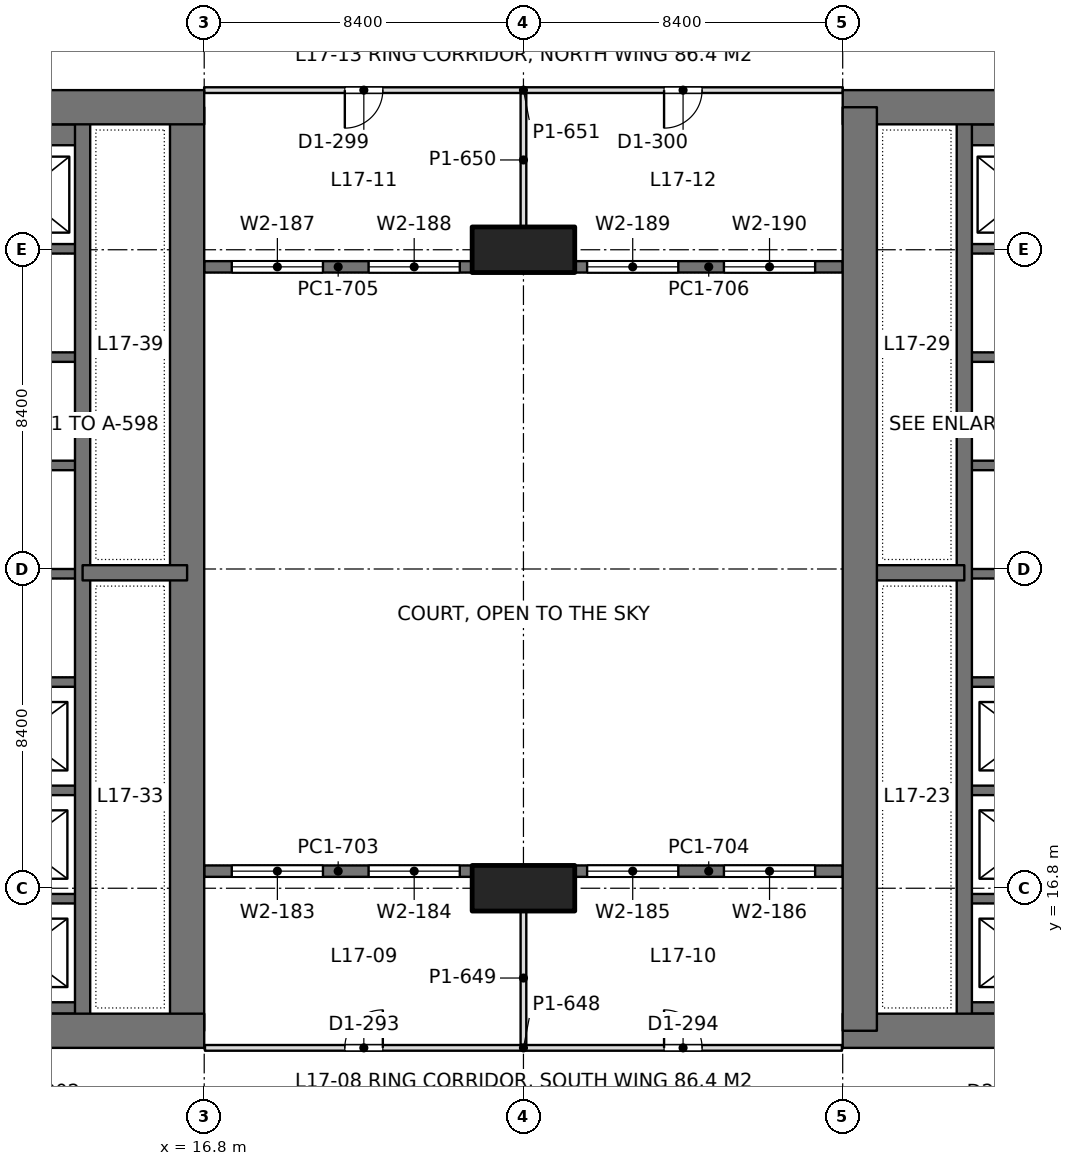
"""IFC4 building model, lengths in metres.
Left out: names, types, materials, properties, quantities, classifications, styles, units other than length and angle.
Written with IfcOpenShell. Run it as: python <this file> out.ifc"""

import sys

from ifc_helpers import new_model, si_unit, direction, frame, frame_2d, origin, origin_2d, place, context, subcontext, project, spatial, rectangle, extrude, element, fill, save


model = new_model("IFC4")
c1 = context("Model", 3, precision=1e-05, world=origin(), true_north=direction((0.0, 1.0)))
c2 = subcontext(c1, "Body", "Model", "MODEL_VIEW")
j1 = project(units=[si_unit("LENGTHUNIT", "METRE"), si_unit("PLANEANGLEUNIT", "RADIAN")], contexts=[c1])
p1 = place(None, origin())
s1 = spatial("IfcSite", under=j1, at=p1, CompositionType="ELEMENT")
p2 = place(p1, origin())
s2 = spatial("IfcBuilding", under=s1, at=p2, CompositionType="ELEMENT")
p3 = place(p2, frame((0.0, 0.0, 77.4)))
s3 = spatial("IfcBuildingStorey", under=s2, at=p3, CompositionType="ELEMENT", Elevation=77.4)
for number, where, z_axis, x_axis in (
    (1, (25.2, 16.8, 0.0), (0.0, 0.0, 1.0), (1.0, 0.0, 0.0)),
    (2, (25.2, 33.6, 0.0), (0.0, 0.0, 1.0), (1.0, 0.0, 0.0)),
):
    element("IfcColumn", number, at=place(p3, frame(where, z_axis=z_axis, x_axis=x_axis)), inside=s3, PredefinedType="COLUMN", context=c2, shape_type="SweptSolid", body=[
        extrude(rectangle(XDim=2.7, YDim=1.2, at=origin_2d()), origin(), (0.0, 0.0, 1.0), 4.5),
    ])
p4 = place(p3, frame((-1.2, 13.05, 0.0), z_axis=(0.0, 0.0, 1.0), x_axis=(1.0, 0.0, 0.0)))
e3 = element("IfcWall", 3, at=p4, inside=s3, PredefinedType="SHEAR", context=c2, shape_type="SweptSolid", body=[
    extrude(rectangle(XDim=18.0, YDim=0.9, at=frame_2d((9.0, 0.0))), origin(), (0.0, 0.0, 1.0), 4.5),
])
p5 = place(p4, frame((8.95, 0.0, 0.0)))
e4 = element("IfcOpeningElement", 4, at=p5, cuts=e3, PredefinedType="OPENING", context=c2, shape_type="SweptSolid", body=[
    extrude(rectangle(XDim=1.8, YDim=2.4, at=frame_2d((0.9, 1.2))), frame((0.0, 0.46, 0.0), z_axis=(0.0, -1.0, 0.0), x_axis=(1.0, 0.0, 0.0)), (0.0, 0.0, 1.0), 0.92),
])
p6 = place(p3, frame((-1.2, 37.35, 0.0), z_axis=(0.0, 0.0, 1.0), x_axis=(1.0, 0.0, 0.0)))
e5 = element("IfcWall", 5, at=p6, inside=s3, PredefinedType="SHEAR", context=c2, shape_type="SweptSolid", body=[
    extrude(rectangle(XDim=18.0, YDim=0.9, at=frame_2d((9.0, 0.0))), origin(), (0.0, 0.0, 1.0), 4.5),
])
p7 = place(p6, frame((8.95, 0.0, 0.0)))
e6 = element("IfcOpeningElement", 6, at=p7, cuts=e5, PredefinedType="OPENING", context=c2, shape_type="SweptSolid", body=[
    extrude(rectangle(XDim=1.8, YDim=2.4, at=frame_2d((0.9, 1.2))), frame((0.0, 0.46, 0.0), z_axis=(0.0, -1.0, 0.0), x_axis=(1.0, 0.0, 0.0)), (0.0, 0.0, 1.0), 0.92),
])
p8 = place(p3, frame((16.35, 13.05, 0.0), z_axis=(0.0, 0.0, 1.0), x_axis=(0.0, 1.0, 0.0)))
e7 = element("IfcWall", 7, at=p8, inside=s3, PredefinedType="SHEAR", context=c2, shape_type="SweptSolid", body=[
    extrude(rectangle(XDim=24.3, YDim=0.9, at=frame_2d((12.15, 0.0))), origin(), (0.0, 0.0, 1.0), 4.5),
])
p9 = place(p3, frame((13.6, 13.05, 0.0), z_axis=(0.0, 0.0, 1.0), x_axis=(0.0, 1.0, 0.0)))
e8 = element("IfcWall", 8, at=p9, inside=s3, PredefinedType="SHEAR", context=c2, shape_type="SweptSolid", body=[
    extrude(rectangle(XDim=24.3, YDim=0.4, at=frame_2d((12.15, 0.0))), origin(), (0.0, 0.0, 1.0), 4.5),
])
p10 = place(p3, frame((13.6, 25.1, 0.0), z_axis=(0.0, 0.0, 1.0), x_axis=(1.0, 0.0, 0.0)))
e9 = element("IfcWall", 9, at=p10, inside=s3, PredefinedType="SHEAR", context=c2, shape_type="SweptSolid", body=[
    extrude(rectangle(XDim=2.75, YDim=0.4, at=frame_2d((1.375, 0.0))), origin(), (0.0, 0.0, 1.0), 4.5),
])
p11 = place(p3, frame((10.4, 13.65, 0.0), z_axis=(0.0, 0.0, 1.0), x_axis=(1.0, 0.0, 0.0)))
e10 = element("IfcWall", 10, at=p11, inside=s3, PredefinedType="SHEAR", context=c2, shape_type="SweptSolid", body=[
    extrude(rectangle(XDim=3.2, YDim=0.3, at=frame_2d((1.6, 0.0))), origin(), (0.0, 0.0, 1.0), 4.5),
])
for number, where, z_axis, x_axis in (
    (11, (10.4, 16.525, 0.0), (0.0, 0.0, 1.0), (1.0, 0.0, 0.0)),
    (12, (10.4, 19.375, 0.0), (0.0, 0.0, 1.0), (1.0, 0.0, 0.0)),
    (13, (10.4, 22.225, 0.0), (0.0, 0.0, 1.0), (1.0, 0.0, 0.0)),
    (14, (10.4, 25.075, 0.0), (0.0, 0.0, 1.0), (1.0, 0.0, 0.0)),
    (15, (10.4, 27.925, 0.0), (0.0, 0.0, 1.0), (1.0, 0.0, 0.0)),
    (16, (10.4, 30.775, 0.0), (0.0, 0.0, 1.0), (1.0, 0.0, 0.0)),
    (17, (10.4, 33.625, 0.0), (0.0, 0.0, 1.0), (1.0, 0.0, 0.0)),
):
    element("IfcWall", number, at=place(p3, frame(where, z_axis=z_axis, x_axis=x_axis)), inside=s3, PredefinedType="SHEAR", context=c2, shape_type="SweptSolid", body=[
        extrude(rectangle(XDim=3.2, YDim=0.25, at=frame_2d((1.6, 0.0))), origin(), (0.0, 0.0, 1.0), 4.5),
    ])
p12 = place(p3, frame((10.4, 36.625, 0.0), z_axis=(0.0, 0.0, 1.0), x_axis=(1.0, 0.0, 0.0)))
e18 = element("IfcWall", 18, at=p12, inside=s3, PredefinedType="SHEAR", context=c2, shape_type="SweptSolid", body=[
    extrude(rectangle(XDim=3.2, YDim=0.55, at=frame_2d((1.6, 0.0))), origin(), (0.0, 0.0, 1.0), 4.5),
])
p13 = place(p3, frame((33.6, 13.05, 0.0), z_axis=(0.0, 0.0, 1.0), x_axis=(1.0, 0.0, 0.0)))
e19 = element("IfcWall", 19, at=p13, inside=s3, PredefinedType="SHEAR", context=c2, shape_type="SweptSolid", body=[
    extrude(rectangle(XDim=18.0, YDim=0.9, at=frame_2d((9.0, 0.0))), origin(), (0.0, 0.0, 1.0), 4.5),
])
p14 = place(p13, frame((7.25, 0.0, 0.0)))
e20 = element("IfcOpeningElement", 20, at=p14, cuts=e19, PredefinedType="OPENING", context=c2, shape_type="SweptSolid", body=[
    extrude(rectangle(XDim=1.8, YDim=2.4, at=frame_2d((0.9, 1.2))), frame((0.0, 0.46, 0.0), z_axis=(0.0, -1.0, 0.0), x_axis=(1.0, 0.0, 0.0)), (0.0, 0.0, 1.0), 0.92),
])
p15 = place(p3, frame((33.6, 37.35, 0.0), z_axis=(0.0, 0.0, 1.0), x_axis=(1.0, 0.0, 0.0)))
e21 = element("IfcWall", 21, at=p15, inside=s3, PredefinedType="SHEAR", context=c2, shape_type="SweptSolid", body=[
    extrude(rectangle(XDim=18.0, YDim=0.9, at=frame_2d((9.0, 0.0))), origin(), (0.0, 0.0, 1.0), 4.5),
])
p16 = place(p15, frame((7.25, 0.0, 0.0)))
e22 = element("IfcOpeningElement", 22, at=p16, cuts=e21, PredefinedType="OPENING", context=c2, shape_type="SweptSolid", body=[
    extrude(rectangle(XDim=1.8, YDim=2.4, at=frame_2d((0.9, 1.2))), frame((0.0, 0.46, 0.0), z_axis=(0.0, -1.0, 0.0), x_axis=(1.0, 0.0, 0.0)), (0.0, 0.0, 1.0), 0.92),
])
p17 = place(p3, frame((34.05, 13.05, 0.0), z_axis=(0.0, 0.0, 1.0), x_axis=(0.0, 1.0, 0.0)))
e23 = element("IfcWall", 23, at=p17, inside=s3, PredefinedType="SHEAR", context=c2, shape_type="SweptSolid", body=[
    extrude(rectangle(XDim=24.3, YDim=0.9, at=frame_2d((12.15, 0.0))), origin(), (0.0, 0.0, 1.0), 4.5),
])
p18 = place(p3, frame((36.8, 13.05, 0.0), z_axis=(0.0, 0.0, 1.0), x_axis=(0.0, 1.0, 0.0)))
e24 = element("IfcWall", 24, at=p18, inside=s3, PredefinedType="SHEAR", context=c2, shape_type="SweptSolid", body=[
    extrude(rectangle(XDim=24.3, YDim=0.4, at=frame_2d((12.15, 0.0))), origin(), (0.0, 0.0, 1.0), 4.5),
])
p19 = place(p3, frame((36.8, 25.1, 0.0), z_axis=(0.0, 0.0, 1.0), x_axis=(-1.0, 0.0, 0.0)))
e25 = element("IfcWall", 25, at=p19, inside=s3, PredefinedType="SHEAR", context=c2, shape_type="SweptSolid", body=[
    extrude(rectangle(XDim=2.75, YDim=0.4, at=frame_2d((1.375, 0.0))), origin(), (0.0, 0.0, 1.0), 4.5),
])
p20 = place(p3, frame((40.0, 13.65, 0.0), z_axis=(0.0, 0.0, 1.0), x_axis=(-1.0, 0.0, 0.0)))
e26 = element("IfcWall", 26, at=p20, inside=s3, PredefinedType="SHEAR", context=c2, shape_type="SweptSolid", body=[
    extrude(rectangle(XDim=3.2, YDim=0.3, at=frame_2d((1.6, 0.0))), origin(), (0.0, 0.0, 1.0), 4.5),
])
for number, where, z_axis, x_axis in (
    (27, (40.0, 16.525, 0.0), (0.0, 0.0, 1.0), (-1.0, 0.0, 0.0)),
    (28, (40.0, 19.375, 0.0), (0.0, 0.0, 1.0), (-1.0, 0.0, 0.0)),
    (29, (40.0, 22.225, 0.0), (0.0, 0.0, 1.0), (-1.0, 0.0, 0.0)),
    (30, (40.0, 25.075, 0.0), (0.0, 0.0, 1.0), (-1.0, 0.0, 0.0)),
    (31, (40.0, 27.925, 0.0), (0.0, 0.0, 1.0), (-1.0, 0.0, 0.0)),
    (32, (40.0, 30.775, 0.0), (0.0, 0.0, 1.0), (-1.0, 0.0, 0.0)),
    (33, (40.0, 33.625, 0.0), (0.0, 0.0, 1.0), (-1.0, 0.0, 0.0)),
):
    element("IfcWall", number, at=place(p3, frame(where, z_axis=z_axis, x_axis=x_axis)), inside=s3, PredefinedType="SHEAR", context=c2, shape_type="SweptSolid", body=[
        extrude(rectangle(XDim=3.2, YDim=0.25, at=frame_2d((1.6, 0.0))), origin(), (0.0, 0.0, 1.0), 4.5),
    ])
p21 = place(p3, frame((40.0, 36.625, 0.0), z_axis=(0.0, 0.0, 1.0), x_axis=(-1.0, 0.0, 0.0)))
e34 = element("IfcWall", 34, at=p21, inside=s3, PredefinedType="SHEAR", context=c2, shape_type="SweptSolid", body=[
    extrude(rectangle(XDim=3.2, YDim=0.55, at=frame_2d((1.6, 0.0))), origin(), (0.0, 0.0, 1.0), 4.5),
])
p22 = place(p3, frame((16.8, 17.25, 0.0), z_axis=(0.0, 0.0, 1.0), x_axis=(1.0, 0.0, 0.0)))
e35 = element("IfcWall", 35, at=p22, inside=s3, PredefinedType="SOLIDWALL", context=c2, shape_type="SweptSolid", body=[
    extrude(rectangle(XDim=7.05, YDim=0.3, at=frame_2d((3.525, 0.0))), origin(), (0.0, 0.0, 1.0), 4.34),
])
p23 = place(p22, frame((0.725, 0.0, 0.9)))
e36 = element("IfcOpeningElement", 36, at=p23, cuts=e35, PredefinedType="OPENING", context=c2, shape_type="SweptSolid", body=[
    extrude(rectangle(XDim=2.4, YDim=1.9, at=frame_2d((1.2, 0.95))), frame((0.0, 0.16, 0.0), z_axis=(0.0, -1.0, 0.0), x_axis=(1.0, 0.0, 0.0)), (0.0, 0.0, 1.0), 0.32),
])
p24 = place(p22, frame((4.325, 0.0, 0.9)))
e37 = element("IfcOpeningElement", 37, at=p24, cuts=e35, PredefinedType="OPENING", context=c2, shape_type="SweptSolid", body=[
    extrude(rectangle(XDim=2.4, YDim=1.9, at=frame_2d((1.2, 0.95))), frame((0.0, 0.16, 0.0), z_axis=(0.0, -1.0, 0.0), x_axis=(1.0, 0.0, 0.0)), (0.0, 0.0, 1.0), 0.32),
])
p25 = place(p3, frame((26.55, 17.25, 0.0), z_axis=(0.0, 0.0, 1.0), x_axis=(1.0, 0.0, 0.0)))
e38 = element("IfcWall", 38, at=p25, inside=s3, PredefinedType="SOLIDWALL", context=c2, shape_type="SweptSolid", body=[
    extrude(rectangle(XDim=7.05, YDim=0.3, at=frame_2d((3.525, 0.0))), origin(), (0.0, 0.0, 1.0), 4.34),
])
p26 = place(p25, frame((0.325, 0.0, 0.9)))
e39 = element("IfcOpeningElement", 39, at=p26, cuts=e38, PredefinedType="OPENING", context=c2, shape_type="SweptSolid", body=[
    extrude(rectangle(XDim=2.4, YDim=1.9, at=frame_2d((1.2, 0.95))), frame((0.0, 0.16, 0.0), z_axis=(0.0, -1.0, 0.0), x_axis=(1.0, 0.0, 0.0)), (0.0, 0.0, 1.0), 0.32),
])
p27 = place(p25, frame((3.925, 0.0, 0.9)))
e40 = element("IfcOpeningElement", 40, at=p27, cuts=e38, PredefinedType="OPENING", context=c2, shape_type="SweptSolid", body=[
    extrude(rectangle(XDim=2.4, YDim=1.9, at=frame_2d((1.2, 0.95))), frame((0.0, 0.16, 0.0), z_axis=(0.0, -1.0, 0.0), x_axis=(1.0, 0.0, 0.0)), (0.0, 0.0, 1.0), 0.32),
])
p28 = place(p3, frame((16.8, 33.15, 0.0), z_axis=(0.0, 0.0, 1.0), x_axis=(1.0, 0.0, 0.0)))
e41 = element("IfcWall", 41, at=p28, inside=s3, PredefinedType="SOLIDWALL", context=c2, shape_type="SweptSolid", body=[
    extrude(rectangle(XDim=7.05, YDim=0.3, at=frame_2d((3.525, 0.0))), origin(), (0.0, 0.0, 1.0), 4.34),
])
p29 = place(p28, frame((0.725, 0.0, 0.9)))
e42 = element("IfcOpeningElement", 42, at=p29, cuts=e41, PredefinedType="OPENING", context=c2, shape_type="SweptSolid", body=[
    extrude(rectangle(XDim=2.4, YDim=1.9, at=frame_2d((1.2, 0.95))), frame((0.0, 0.16, 0.0), z_axis=(0.0, -1.0, 0.0), x_axis=(1.0, 0.0, 0.0)), (0.0, 0.0, 1.0), 0.32),
])
p30 = place(p28, frame((4.325, 0.0, 0.9)))
e43 = element("IfcOpeningElement", 43, at=p30, cuts=e41, PredefinedType="OPENING", context=c2, shape_type="SweptSolid", body=[
    extrude(rectangle(XDim=2.4, YDim=1.9, at=frame_2d((1.2, 0.95))), frame((0.0, 0.16, 0.0), z_axis=(0.0, -1.0, 0.0), x_axis=(1.0, 0.0, 0.0)), (0.0, 0.0, 1.0), 0.32),
])
p31 = place(p3, frame((26.55, 33.15, 0.0), z_axis=(0.0, 0.0, 1.0), x_axis=(1.0, 0.0, 0.0)))
e44 = element("IfcWall", 44, at=p31, inside=s3, PredefinedType="SOLIDWALL", context=c2, shape_type="SweptSolid", body=[
    extrude(rectangle(XDim=7.05, YDim=0.3, at=frame_2d((3.525, 0.0))), origin(), (0.0, 0.0, 1.0), 4.34),
])
p32 = place(p31, frame((0.325, 0.0, 0.9)))
e45 = element("IfcOpeningElement", 45, at=p32, cuts=e44, PredefinedType="OPENING", context=c2, shape_type="SweptSolid", body=[
    extrude(rectangle(XDim=2.4, YDim=1.9, at=frame_2d((1.2, 0.95))), frame((0.0, 0.16, 0.0), z_axis=(0.0, -1.0, 0.0), x_axis=(1.0, 0.0, 0.0)), (0.0, 0.0, 1.0), 0.32),
])
p33 = place(p31, frame((3.925, 0.0, 0.9)))
e46 = element("IfcOpeningElement", 46, at=p33, cuts=e44, PredefinedType="OPENING", context=c2, shape_type="SweptSolid", body=[
    extrude(rectangle(XDim=2.4, YDim=1.9, at=frame_2d((1.2, 0.95))), frame((0.0, 0.16, 0.0), z_axis=(0.0, -1.0, 0.0), x_axis=(1.0, 0.0, 0.0)), (0.0, 0.0, 1.0), 0.32),
])
p34 = place(p3, frame((16.82, 12.6, 0.0), z_axis=(0.0, 0.0, 1.0), x_axis=(1.0, 0.0, 0.0)))
e47 = element("IfcWall", 47, at=p34, inside=s3, PredefinedType="PARTITIONING", context=c2, shape_type="SweptSolid", body=[
    extrude(rectangle(XDim=16.76, YDim=0.15, at=frame_2d((8.38, 0.0))), origin(), (0.0, 0.0, 1.0), 3.74),
])
p35 = place(p34, frame((3.68, 0.0, 0.0)))
e48 = element("IfcOpeningElement", 48, at=p35, cuts=e47, PredefinedType="OPENING", context=c2, shape_type="SweptSolid", body=[
    extrude(rectangle(XDim=1.0, YDim=2.2, at=frame_2d((0.5, 1.1))), frame((0.0, 0.085, 0.0), z_axis=(0.0, -1.0, 0.0), x_axis=(1.0, 0.0, 0.0)), (0.0, 0.0, 1.0), 0.17),
])
p36 = place(p34, frame((12.08, 0.0, 0.0)))
e49 = element("IfcOpeningElement", 49, at=p36, cuts=e47, PredefinedType="OPENING", context=c2, shape_type="SweptSolid", body=[
    extrude(rectangle(XDim=1.0, YDim=2.2, at=frame_2d((0.5, 1.1))), frame((0.0, 0.085, 0.0), z_axis=(0.0, -1.0, 0.0), x_axis=(1.0, 0.0, 0.0)), (0.0, 0.0, 1.0), 0.17),
])
p37 = place(p3, frame((25.2, 12.674, 0.0), z_axis=(0.0, 0.0, 1.0), x_axis=(0.0, 1.0, 0.0)))
e50 = element("IfcWall", 50, at=p37, inside=s3, PredefinedType="PARTITIONING", context=c2, shape_type="SweptSolid", body=[
    extrude(rectangle(XDim=3.527, YDim=0.15, at=frame_2d((1.763, 0.0))), origin(), (0.0, 0.0, 1.0), 3.74),
])
p38 = place(p3, frame((16.798, 37.8, 0.0), z_axis=(0.0, 0.0, 1.0), x_axis=(1.0, 0.0, 0.0)))
e51 = element("IfcWall", 51, at=p38, inside=s3, PredefinedType="PARTITIONING", context=c2, shape_type="SweptSolid", body=[
    extrude(rectangle(XDim=16.804, YDim=0.15, at=frame_2d((8.402, 0.0))), origin(), (0.0, 0.0, 1.0), 3.74),
])
p39 = place(p38, frame((3.702, 0.0, 0.0)))
e52 = element("IfcOpeningElement", 52, at=p39, cuts=e51, PredefinedType="OPENING", context=c2, shape_type="SweptSolid", body=[
    extrude(rectangle(XDim=1.0, YDim=2.2, at=frame_2d((0.5, 1.1))), frame((0.0, 0.085, 0.0), z_axis=(0.0, -1.0, 0.0), x_axis=(1.0, 0.0, 0.0)), (0.0, 0.0, 1.0), 0.17),
])
p40 = place(p38, frame((12.102, 0.0, 0.0)))
e53 = element("IfcOpeningElement", 53, at=p40, cuts=e51, PredefinedType="OPENING", context=c2, shape_type="SweptSolid", body=[
    extrude(rectangle(XDim=1.0, YDim=2.2, at=frame_2d((0.5, 1.1))), frame((0.0, 0.085, 0.0), z_axis=(0.0, -1.0, 0.0), x_axis=(1.0, 0.0, 0.0)), (0.0, 0.0, 1.0), 0.17),
])
p41 = place(p3, frame((25.2, 34.199, 0.0), z_axis=(0.0, 0.0, 1.0), x_axis=(0.0, 1.0, 0.0)))
e54 = element("IfcWall", 54, at=p41, inside=s3, PredefinedType="PARTITIONING", context=c2, shape_type="SweptSolid", body=[
    extrude(rectangle(XDim=3.527, YDim=0.15, at=frame_2d((1.764, 0.0))), origin(), (0.0, 0.0, 1.0), 3.74),
])
p42 = place(p23, origin())
e55 = element("IfcWindow", 55, at=p42, inside=s3, PartitioningType="SINGLE_PANEL", PredefinedType="WINDOW", context=c2, shape_type="SweptSolid", body=[
    extrude(rectangle(XDim=2.4, YDim=1.9, at=frame_2d((1.2, 0.95))), frame((0.0, 0.03, 0.0), z_axis=(0.0, -1.0, 0.0), x_axis=(1.0, 0.0, 0.0)), (0.0, 0.0, 1.0), 0.06),
])
fill(e36, e55)
p43 = place(p24, origin())
e56 = element("IfcWindow", 56, at=p43, inside=s3, PartitioningType="SINGLE_PANEL", PredefinedType="WINDOW", context=c2, shape_type="SweptSolid", body=[
    extrude(rectangle(XDim=2.4, YDim=1.9, at=frame_2d((1.2, 0.95))), frame((0.0, 0.03, 0.0), z_axis=(0.0, -1.0, 0.0), x_axis=(1.0, 0.0, 0.0)), (0.0, 0.0, 1.0), 0.06),
])
fill(e37, e56)
p44 = place(p26, origin())
e57 = element("IfcWindow", 57, at=p44, inside=s3, PartitioningType="SINGLE_PANEL", PredefinedType="WINDOW", context=c2, shape_type="SweptSolid", body=[
    extrude(rectangle(XDim=2.4, YDim=1.9, at=frame_2d((1.2, 0.95))), frame((0.0, 0.03, 0.0), z_axis=(0.0, -1.0, 0.0), x_axis=(1.0, 0.0, 0.0)), (0.0, 0.0, 1.0), 0.06),
])
fill(e39, e57)
p45 = place(p27, origin())
e58 = element("IfcWindow", 58, at=p45, inside=s3, PartitioningType="SINGLE_PANEL", PredefinedType="WINDOW", context=c2, shape_type="SweptSolid", body=[
    extrude(rectangle(XDim=2.4, YDim=1.9, at=frame_2d((1.2, 0.95))), frame((0.0, 0.03, 0.0), z_axis=(0.0, -1.0, 0.0), x_axis=(1.0, 0.0, 0.0)), (0.0, 0.0, 1.0), 0.06),
])
fill(e40, e58)
p46 = place(p29, origin())
e59 = element("IfcWindow", 59, at=p46, inside=s3, PartitioningType="SINGLE_PANEL", PredefinedType="WINDOW", context=c2, shape_type="SweptSolid", body=[
    extrude(rectangle(XDim=2.4, YDim=1.9, at=frame_2d((1.2, 0.95))), frame((0.0, 0.03, 0.0), z_axis=(0.0, -1.0, 0.0), x_axis=(1.0, 0.0, 0.0)), (0.0, 0.0, 1.0), 0.06),
])
fill(e42, e59)
p47 = place(p30, origin())
e60 = element("IfcWindow", 60, at=p47, inside=s3, PartitioningType="SINGLE_PANEL", PredefinedType="WINDOW", context=c2, shape_type="SweptSolid", body=[
    extrude(rectangle(XDim=2.4, YDim=1.9, at=frame_2d((1.2, 0.95))), frame((0.0, 0.03, 0.0), z_axis=(0.0, -1.0, 0.0), x_axis=(1.0, 0.0, 0.0)), (0.0, 0.0, 1.0), 0.06),
])
fill(e43, e60)
p48 = place(p32, origin())
e61 = element("IfcWindow", 61, at=p48, inside=s3, PartitioningType="SINGLE_PANEL", PredefinedType="WINDOW", context=c2, shape_type="SweptSolid", body=[
    extrude(rectangle(XDim=2.4, YDim=1.9, at=frame_2d((1.2, 0.95))), frame((0.0, 0.03, 0.0), z_axis=(0.0, -1.0, 0.0), x_axis=(1.0, 0.0, 0.0)), (0.0, 0.0, 1.0), 0.06),
])
fill(e45, e61)
p49 = place(p33, origin())
e62 = element("IfcWindow", 62, at=p49, inside=s3, PartitioningType="SINGLE_PANEL", PredefinedType="WINDOW", context=c2, shape_type="SweptSolid", body=[
    extrude(rectangle(XDim=2.4, YDim=1.9, at=frame_2d((1.2, 0.95))), frame((0.0, 0.03, 0.0), z_axis=(0.0, -1.0, 0.0), x_axis=(1.0, 0.0, 0.0)), (0.0, 0.0, 1.0), 0.06),
])
fill(e46, e62)
p50 = place(p35, origin())
e63 = element("IfcDoor", 63, at=p50, inside=s3, OperationType="SINGLE_SWING_RIGHT", PredefinedType="DOOR", context=c2, shape_type="SweptSolid", body=[
    extrude(rectangle(XDim=1.0, YDim=2.2, at=frame_2d((0.5, 1.1))), frame((0.0, 0.025, 0.0), z_axis=(0.0, -1.0, 0.0), x_axis=(1.0, 0.0, 0.0)), (0.0, 0.0, 1.0), 0.05),
])
fill(e48, e63)
p51 = place(p36, origin())
e64 = element("IfcDoor", 64, at=p51, inside=s3, OperationType="SINGLE_SWING_LEFT", PredefinedType="DOOR", context=c2, shape_type="SweptSolid", body=[
    extrude(rectangle(XDim=1.0, YDim=2.2, at=frame_2d((0.5, 1.1))), frame((0.0, 0.025, 0.0), z_axis=(0.0, -1.0, 0.0), x_axis=(1.0, 0.0, 0.0)), (0.0, 0.0, 1.0), 0.05),
])
fill(e49, e64)
p52 = place(p39, frame((1.0, 0.0, 0.0), z_axis=(0.0, 0.0, 1.0), x_axis=(-1.0, 0.0, 0.0)))
e65 = element("IfcDoor", 65, at=p52, inside=s3, OperationType="SINGLE_SWING_RIGHT", PredefinedType="DOOR", context=c2, shape_type="SweptSolid", body=[
    extrude(rectangle(XDim=1.0, YDim=2.2, at=frame_2d((0.5, 1.1))), frame((0.0, 0.025, 0.0), z_axis=(0.0, -1.0, 0.0), x_axis=(1.0, 0.0, 0.0)), (0.0, 0.0, 1.0), 0.05),
])
fill(e52, e65)
p53 = place(p40, frame((1.0, 0.0, 0.0), z_axis=(0.0, 0.0, 1.0), x_axis=(-1.0, 0.0, 0.0)))
e66 = element("IfcDoor", 66, at=p53, inside=s3, OperationType="SINGLE_SWING_RIGHT", PredefinedType="DOOR", context=c2, shape_type="SweptSolid", body=[
    extrude(rectangle(XDim=1.0, YDim=2.2, at=frame_2d((0.5, 1.1))), frame((0.0, 0.025, 0.0), z_axis=(0.0, -1.0, 0.0), x_axis=(1.0, 0.0, 0.0)), (0.0, 0.0, 1.0), 0.05),
])
fill(e53, e66)
save(model, sys.argv[1])
